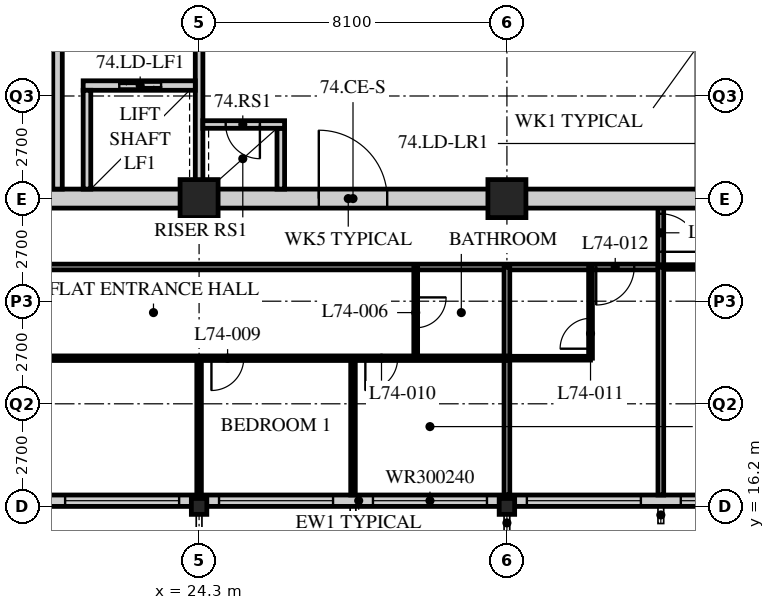
"""IFC4 building model, lengths in metres.
Left out: names, types, materials, properties, quantities, classifications, styles, units other than length and angle.
Written with IfcOpenShell. Run it as: python <this file> out.ifc"""

import sys

from ifc_helpers import new_model, si_unit, direction, frame, frame_2d, origin, origin_2d, place, context, subcontext, project, spatial, rectangle, hollow_rectangle, i_section, extrude, element, fill, save


model = new_model("IFC4")
c1 = context("Model", 3, precision=1e-05, world=origin(), true_north=direction((0.0, 1.0)))
c2 = subcontext(c1, "Body", "Model", "MODEL_VIEW")
j1 = project(units=[si_unit("LENGTHUNIT", "METRE"), si_unit("PLANEANGLEUNIT", "RADIAN")], contexts=[c1])
p1 = place(None, origin())
s1 = spatial("IfcSite", under=j1, at=p1, CompositionType="ELEMENT")
p2 = place(p1, origin())
s2 = spatial("IfcBuilding", under=s1, at=p2, CompositionType="ELEMENT")
p3 = place(p2, frame((0.0, 0.0, 289.2)))
s3 = spatial("IfcBuildingStorey", under=s2, at=p3, CompositionType="ELEMENT", Elevation=289.2)
p4 = place(p3, frame((24.3, 16.2, 0.0), z_axis=(0.0, 0.0, 1.0), x_axis=(1.0, 0.0, 0.0)))
e1 = element("IfcColumn", 1, at=p4, inside=s3, PredefinedType="COLUMN", context=c2, shape_type="SweptSolid", body=[
    extrude(i_section(OverallWidth=0.407, OverallDepth=0.419, WebThickness=0.031, FlangeThickness=0.049, FilletRadius=0.015, at=origin_2d()), origin(), (0.0, 0.0, 1.0), 3.9),
])
p5 = place(p3, frame((24.3, 24.3, 0.0), z_axis=(0.0, 0.0, 1.0), x_axis=(1.0, 0.0, 0.0)))
e2 = element("IfcColumn", 2, at=p5, inside=s3, PredefinedType="COLUMN", context=c2, shape_type="SweptSolid", body=[
    extrude(hollow_rectangle(XDim=1.0, YDim=1.0, WallThickness=0.1, at=origin_2d()), origin(), (0.0, 0.0, 1.0), 3.9),
])
p6 = place(p3, frame((32.4, 16.2, 0.0), z_axis=(0.0, 0.0, 1.0), x_axis=(1.0, 0.0, 0.0)))
e3 = element("IfcColumn", 3, at=p6, inside=s3, PredefinedType="COLUMN", context=c2, shape_type="SweptSolid", body=[
    extrude(i_section(OverallWidth=0.407, OverallDepth=0.419, WebThickness=0.031, FlangeThickness=0.049, FilletRadius=0.015, at=origin_2d()), origin(), (0.0, 0.0, 1.0), 3.9),
])
p7 = place(p3, frame((32.4, 24.3, 0.0), z_axis=(0.0, 0.0, 1.0), x_axis=(1.0, 0.0, 0.0)))
e4 = element("IfcColumn", 4, at=p7, inside=s3, PredefinedType="COLUMN", context=c2, shape_type="SweptSolid", body=[
    extrude(hollow_rectangle(XDim=1.0, YDim=1.0, WallThickness=0.1, at=origin_2d()), origin(), (0.0, 0.0, 1.0), 3.9),
])
p8 = place(p3, frame((8.4, 16.35, 0.0), z_axis=(0.0, 0.0, 1.0), x_axis=(1.0, 0.0, 0.0)))
e5 = element("IfcWall", 5, at=p8, inside=s3, PredefinedType="SOLIDWALL", context=c2, shape_type="SweptSolid", body=[
    extrude(rectangle(XDim=40.2, YDim=0.3, at=frame_2d((20.1, 0.0))), origin(), (0.0, 0.0, 1.0), 3.69),
])
p9 = place(p8, frame((0.225, 0.0, 0.6)))
e6 = element("IfcOpeningElement", 6, at=p9, cuts=e5, PredefinedType="OPENING", context=c2, shape_type="SweptSolid", body=[
    extrude(rectangle(XDim=3.0, YDim=2.4, at=frame_2d((1.5, 1.2))), frame((0.0, 0.16, 0.0), z_axis=(0.0, -1.0, 0.0), x_axis=(1.0, 0.0, 0.0)), (0.0, 0.0, 1.0), 0.32),
])
p10 = place(p8, frame((4.275, 0.0, 0.6)))
e7 = element("IfcOpeningElement", 7, at=p10, cuts=e5, PredefinedType="OPENING", context=c2, shape_type="SweptSolid", body=[
    extrude(rectangle(XDim=3.0, YDim=2.4, at=frame_2d((1.5, 1.2))), frame((0.0, 0.16, 0.0), z_axis=(0.0, -1.0, 0.0), x_axis=(1.0, 0.0, 0.0)), (0.0, 0.0, 1.0), 0.32),
])
p11 = place(p8, frame((8.325, 0.0, 0.6)))
e8 = element("IfcOpeningElement", 8, at=p11, cuts=e5, PredefinedType="OPENING", context=c2, shape_type="SweptSolid", body=[
    extrude(rectangle(XDim=3.0, YDim=2.4, at=frame_2d((1.5, 1.2))), frame((0.0, 0.16, 0.0), z_axis=(0.0, -1.0, 0.0), x_axis=(1.0, 0.0, 0.0)), (0.0, 0.0, 1.0), 0.32),
])
p12 = place(p8, frame((12.375, 0.0, 0.6)))
e9 = element("IfcOpeningElement", 9, at=p12, cuts=e5, PredefinedType="OPENING", context=c2, shape_type="SweptSolid", body=[
    extrude(rectangle(XDim=3.0, YDim=2.4, at=frame_2d((1.5, 1.2))), frame((0.0, 0.16, 0.0), z_axis=(0.0, -1.0, 0.0), x_axis=(1.0, 0.0, 0.0)), (0.0, 0.0, 1.0), 0.32),
])
p13 = place(p8, frame((16.425, 0.0, 0.6)))
e10 = element("IfcOpeningElement", 10, at=p13, cuts=e5, PredefinedType="OPENING", context=c2, shape_type="SweptSolid", body=[
    extrude(rectangle(XDim=3.0, YDim=2.4, at=frame_2d((1.5, 1.2))), frame((0.0, 0.16, 0.0), z_axis=(0.0, -1.0, 0.0), x_axis=(1.0, 0.0, 0.0)), (0.0, 0.0, 1.0), 0.32),
])
p14 = place(p8, frame((20.475, 0.0, 0.6)))
e11 = element("IfcOpeningElement", 11, at=p14, cuts=e5, PredefinedType="OPENING", context=c2, shape_type="SweptSolid", body=[
    extrude(rectangle(XDim=3.0, YDim=2.4, at=frame_2d((1.5, 1.2))), frame((0.0, 0.16, 0.0), z_axis=(0.0, -1.0, 0.0), x_axis=(1.0, 0.0, 0.0)), (0.0, 0.0, 1.0), 0.32),
])
p15 = place(p8, frame((24.525, 0.0, 0.6)))
e12 = element("IfcOpeningElement", 12, at=p15, cuts=e5, PredefinedType="OPENING", context=c2, shape_type="SweptSolid", body=[
    extrude(rectangle(XDim=3.0, YDim=2.4, at=frame_2d((1.5, 1.2))), frame((0.0, 0.16, 0.0), z_axis=(0.0, -1.0, 0.0), x_axis=(1.0, 0.0, 0.0)), (0.0, 0.0, 1.0), 0.32),
])
p16 = place(p8, frame((28.575, 0.0, 0.6)))
e13 = element("IfcOpeningElement", 13, at=p16, cuts=e5, PredefinedType="OPENING", context=c2, shape_type="SweptSolid", body=[
    extrude(rectangle(XDim=3.0, YDim=2.4, at=frame_2d((1.5, 1.2))), frame((0.0, 0.16, 0.0), z_axis=(0.0, -1.0, 0.0), x_axis=(1.0, 0.0, 0.0)), (0.0, 0.0, 1.0), 0.32),
])
p17 = place(p8, frame((32.625, 0.0, 0.6)))
e14 = element("IfcOpeningElement", 14, at=p17, cuts=e5, PredefinedType="OPENING", context=c2, shape_type="SweptSolid", body=[
    extrude(rectangle(XDim=3.0, YDim=2.4, at=frame_2d((1.5, 1.2))), frame((0.0, 0.16, 0.0), z_axis=(0.0, -1.0, 0.0), x_axis=(1.0, 0.0, 0.0)), (0.0, 0.0, 1.0), 0.32),
])
p18 = place(p8, frame((36.675, 0.0, 0.6)))
e15 = element("IfcOpeningElement", 15, at=p18, cuts=e5, PredefinedType="OPENING", context=c2, shape_type="SweptSolid", body=[
    extrude(rectangle(XDim=3.0, YDim=2.4, at=frame_2d((1.5, 1.2))), frame((0.0, 0.16, 0.0), z_axis=(0.0, -1.0, 0.0), x_axis=(1.0, 0.0, 0.0)), (0.0, 0.0, 1.0), 0.32),
])
p19 = place(p3, frame((12.15, 22.5, 0.0), z_axis=(0.0, 0.0, 1.0), x_axis=(1.0, 0.0, 0.0)))
e16 = element("IfcWall", 16, at=p19, inside=s3, PredefinedType="PARTITIONING", context=c2, shape_type="SweptSolid", body=[
    extrude(rectangle(XDim=24.3, YDim=0.15, at=frame_2d((12.15, 0.0))), origin(), (0.0, 0.0, 1.0), 3.69),
])
p20 = place(p19, frame((4.45, 0.0, 0.0)))
e17 = element("IfcOpeningElement", 17, at=p20, cuts=e16, PredefinedType="OPENING", context=c2, shape_type="SweptSolid", body=[
    extrude(rectangle(XDim=1.0, YDim=2.1, at=frame_2d((0.5, 1.05))), frame((0.0, 0.085, 0.0), z_axis=(0.0, -1.0, 0.0), x_axis=(1.0, 0.0, 0.0)), (0.0, 0.0, 1.0), 0.17),
])
p21 = place(p19, frame((22.6, 0.0, 0.0)))
e18 = element("IfcOpeningElement", 18, at=p21, cuts=e16, PredefinedType="OPENING", context=c2, shape_type="SweptSolid", body=[
    extrude(rectangle(XDim=1.0, YDim=2.1, at=frame_2d((0.5, 1.05))), frame((0.0, 0.085, 0.0), z_axis=(0.0, -1.0, 0.0), x_axis=(1.0, 0.0, 0.0)), (0.0, 0.0, 1.0), 0.17),
])
p22 = place(p19, frame((2.625, 0.0, 0.0)))
e19 = element("IfcOpeningElement", 19, at=p22, cuts=e16, PredefinedType="OPENING", context=c2, shape_type="SweptSolid", body=[
    extrude(rectangle(XDim=1.0, YDim=2.1, at=frame_2d((0.5, 1.05))), frame((0.0, 0.085, 0.0), z_axis=(0.0, -1.0, 0.0), x_axis=(1.0, 0.0, 0.0)), (0.0, 0.0, 1.0), 0.17),
])
p23 = place(p3, frame((36.45, 22.5, 0.0), z_axis=(0.0, 0.0, 1.0), x_axis=(0.0, 1.0, 0.0)))
e20 = element("IfcWall", 20, at=p23, inside=s3, PredefinedType="PARTITIONING", context=c2, shape_type="SweptSolid", body=[
    extrude(rectangle(XDim=1.8, YDim=0.15, at=frame_2d((0.9, 0.0))), origin(), (0.0, 0.0, 1.0), 3.69),
])
p24 = place(p23, frame((0.4, 0.0, 0.0)))
e21 = element("IfcOpeningElement", 21, at=p24, cuts=e20, PredefinedType="OPENING", context=c2, shape_type="SweptSolid", body=[
    extrude(rectangle(XDim=1.0, YDim=2.1, at=frame_2d((0.5, 1.05))), frame((0.0, 0.085, 0.0), z_axis=(0.0, -1.0, 0.0), x_axis=(1.0, 0.0, 0.0)), (0.0, 0.0, 1.0), 0.17),
])
p25 = place(p3, frame((30.0, 22.5, 0.0), z_axis=(0.0, 0.0, 1.0), x_axis=(0.0, -1.0, 0.0)))
e22 = element("IfcWall", 22, at=p25, inside=s3, PredefinedType="PARTITIONING", context=c2, shape_type="SweptSolid", body=[
    extrude(rectangle(XDim=2.4, YDim=0.1, at=frame_2d((1.2, 0.0))), origin(), (0.0, 0.0, 1.0), 3.69),
])
p26 = place(p25, frame((0.8, 0.0, 0.0)))
e23 = element("IfcOpeningElement", 23, at=p26, cuts=e22, PredefinedType="OPENING", context=c2, shape_type="SweptSolid", body=[
    extrude(rectangle(XDim=0.8, YDim=2.1, at=frame_2d((0.4, 1.05))), frame((0.0, 0.06, 0.0), z_axis=(0.0, -1.0, 0.0), x_axis=(1.0, 0.0, 0.0)), (0.0, 0.0, 1.0), 0.12),
])
p27 = place(p3, frame((24.3, 20.1, 0.0), z_axis=(0.0, 0.0, 1.0), x_axis=(0.0, -1.0, 0.0)))
e24 = element("IfcWall", 24, at=p27, inside=s3, PredefinedType="PARTITIONING", context=c2, shape_type="SweptSolid", body=[
    extrude(rectangle(XDim=3.6, YDim=0.12, at=frame_2d((1.8, 0.0))), origin(), (0.0, 0.0, 1.0), 3.078),
])
p28 = place(p3, frame((28.35, 20.1, 0.0), z_axis=(0.0, 0.0, 1.0), x_axis=(0.0, -1.0, 0.0)))
e25 = element("IfcWall", 25, at=p28, inside=s3, PredefinedType="PARTITIONING", context=c2, shape_type="SweptSolid", body=[
    extrude(rectangle(XDim=3.6, YDim=0.12, at=frame_2d((1.8, 0.0))), origin(), (0.0, 0.0, 1.0), 3.69),
])
p29 = place(p3, frame((32.4, 22.5, 0.0), z_axis=(0.0, 0.0, 1.0), x_axis=(0.0, -1.0, 0.0)))
e26 = element("IfcWall", 26, at=p29, inside=s3, PredefinedType="PARTITIONING", context=c2, shape_type="SweptSolid", body=[
    extrude(rectangle(XDim=6.0, YDim=0.15, at=frame_2d((3.0, 0.0))), origin(), (0.0, 0.0, 1.0), 3.078),
])
p30 = place(p3, frame((32.4, 20.1, 0.0), z_axis=(0.0, 0.0, 1.0), x_axis=(1.0, 0.0, 0.0)))
e27 = element("IfcWall", 27, at=p30, inside=s3, PredefinedType="PARTITIONING", context=c2, shape_type="SweptSolid", body=[
    extrude(rectangle(XDim=2.2, YDim=0.1, at=frame_2d((1.1, 0.0))), origin(), (0.0, 0.0, 1.0), 3.69),
])
p31 = place(p3, frame((34.6, 22.5, 0.0), z_axis=(0.0, 0.0, 1.0), x_axis=(0.0, -1.0, 0.0)))
e28 = element("IfcWall", 28, at=p31, inside=s3, PredefinedType="PARTITIONING", context=c2, shape_type="SweptSolid", body=[
    extrude(rectangle(XDim=2.4, YDim=0.1, at=frame_2d((1.2, 0.0))), origin(), (0.0, 0.0, 1.0), 3.69),
])
p32 = place(p31, frame((1.35, 0.0, 0.0)))
e29 = element("IfcOpeningElement", 29, at=p32, cuts=e28, PredefinedType="OPENING", context=c2, shape_type="SweptSolid", body=[
    extrude(rectangle(XDim=0.8, YDim=2.1, at=frame_2d((0.4, 1.05))), frame((0.0, 0.06, 0.0), z_axis=(0.0, -1.0, 0.0), x_axis=(1.0, 0.0, 0.0)), (0.0, 0.0, 1.0), 0.12),
])
p33 = place(p3, frame((12.15, 20.1, 0.0), z_axis=(0.0, 0.0, 1.0), x_axis=(1.0, 0.0, 0.0)))
e30 = element("IfcWall", 30, at=p33, inside=s3, PredefinedType="PARTITIONING", context=c2, shape_type="SweptSolid", body=[
    extrude(rectangle(XDim=20.25, YDim=0.12, at=frame_2d((10.125, 0.0))), origin(), (0.0, 0.0, 1.0), 3.69),
])
p34 = place(p33, frame((5.025, 0.0, 0.0)))
e31 = element("IfcOpeningElement", 31, at=p34, cuts=e30, PredefinedType="OPENING", context=c2, shape_type="SweptSolid", body=[
    extrude(rectangle(XDim=0.85, YDim=2.1, at=frame_2d((0.425, 1.05))), frame((0.0, 0.07, 0.0), z_axis=(0.0, -1.0, 0.0), x_axis=(1.0, 0.0, 0.0)), (0.0, 0.0, 1.0), 0.14),
])
p35 = place(p33, frame((12.475, 0.0, 0.0)))
e32 = element("IfcOpeningElement", 32, at=p35, cuts=e30, PredefinedType="OPENING", context=c2, shape_type="SweptSolid", body=[
    extrude(rectangle(XDim=0.85, YDim=2.1, at=frame_2d((0.425, 1.05))), frame((0.0, 0.07, 0.0), z_axis=(0.0, -1.0, 0.0), x_axis=(1.0, 0.0, 0.0)), (0.0, 0.0, 1.0), 0.14),
])
p36 = place(p33, frame((16.525, 0.0, 0.0)))
e33 = element("IfcOpeningElement", 33, at=p36, cuts=e30, PredefinedType="OPENING", context=c2, shape_type="SweptSolid", body=[
    extrude(rectangle(XDim=0.85, YDim=2.1, at=frame_2d((0.425, 1.05))), frame((0.0, 0.07, 0.0), z_axis=(0.0, -1.0, 0.0), x_axis=(1.0, 0.0, 0.0)), (0.0, 0.0, 1.0), 0.14),
])
p37 = place(p33, frame((2.725, 0.0, 0.0)))
e34 = element("IfcOpeningElement", 34, at=p37, cuts=e30, PredefinedType="OPENING", context=c2, shape_type="SweptSolid", body=[
    extrude(rectangle(XDim=0.85, YDim=2.1, at=frame_2d((0.425, 1.05))), frame((0.0, 0.07, 0.0), z_axis=(0.0, -1.0, 0.0), x_axis=(1.0, 0.0, 0.0)), (0.0, 0.0, 1.0), 0.14),
])
p38 = place(p3, frame((36.45, 22.5, 0.0), z_axis=(0.0, 0.0, 1.0), x_axis=(1.0, 0.0, 0.0)))
e35 = element("IfcWall", 35, at=p38, inside=s3, PredefinedType="PARTITIONING", context=c2, shape_type="SweptSolid", body=[
    extrude(rectangle(XDim=6.45, YDim=0.12, at=frame_2d((3.225, 0.0))), origin(), (0.0, 0.0, 1.0), 3.69),
])
p39 = place(p38, frame((2.8, 0.0, 0.0)))
e36 = element("IfcOpeningElement", 36, at=p39, cuts=e35, PredefinedType="OPENING", context=c2, shape_type="SweptSolid", body=[
    extrude(rectangle(XDim=0.85, YDim=2.1, at=frame_2d((0.425, 1.05))), frame((0.0, 0.07, 0.0), z_axis=(0.0, -1.0, 0.0), x_axis=(1.0, 0.0, 0.0)), (0.0, 0.0, 1.0), 0.14),
])
p40 = place(p3, frame((36.45, 16.5, 0.0), z_axis=(0.0, 0.0, 1.0), x_axis=(0.0, 1.0, 0.0)))
e37 = element("IfcWall", 37, at=p40, inside=s3, PredefinedType="PARTITIONING", context=c2, shape_type="SweptSolid", body=[
    extrude(rectangle(XDim=6.0, YDim=0.15, at=frame_2d((3.0, 0.0))), origin(), (0.0, 0.0, 1.0), 3.69),
])
p41 = place(p3, frame((15.95, 24.3, 0.0), z_axis=(0.0, 0.0, 1.0), x_axis=(1.0, 0.0, 0.0)))
e38 = element("IfcWall", 38, at=p41, inside=s3, PredefinedType="SOLIDWALL", context=c2, shape_type="SweptSolid", body=[
    extrude(rectangle(XDim=24.55, YDim=0.5, at=frame_2d((12.275, 0.0))), origin(), (0.0, 0.0, 1.0), 3.04),
])
p42 = place(p41, frame((11.5, 0.0, 0.0)))
e39 = element("IfcOpeningElement", 39, at=p42, cuts=e38, PredefinedType="OPENING", context=c2, shape_type="SweptSolid", body=[
    extrude(rectangle(XDim=1.8, YDim=2.4, at=frame_2d((0.9, 1.2))), frame((0.0, 0.26, 0.0), z_axis=(0.0, -1.0, 0.0), x_axis=(1.0, 0.0, 0.0)), (0.0, 0.0, 1.0), 0.52),
])
p43 = place(p3, frame((24.3, 24.55, 0.0), z_axis=(0.0, 0.0, 1.0), x_axis=(0.0, 1.0, 0.0)))
e40 = element("IfcWall", 40, at=p43, inside=s3, PredefinedType="SOLIDWALL", context=c2, shape_type="SweptSolid", body=[
    extrude(rectangle(XDim=7.75, YDim=0.2, at=frame_2d((3.875, 0.0))), origin(), (0.0, 0.0, 1.0), 3.078),
])
p44 = place(p43, frame((4.6, 0.0, 0.0)))
e41 = element("IfcOpeningElement", 41, at=p44, cuts=e40, PredefinedType="OPENING", context=c2, shape_type="SweptSolid", body=[
    extrude(rectangle(XDim=1.2, YDim=2.1, at=frame_2d((0.6, 1.05))), frame((0.0, 0.11, 0.0), z_axis=(0.0, -1.0, 0.0), x_axis=(1.0, 0.0, 0.0)), (0.0, 0.0, 1.0), 0.22),
])
p45 = place(p3, frame((20.575, 24.55, 0.0), z_axis=(0.0, 0.0, 1.0), x_axis=(0.0, 1.0, 0.0)))
e42 = element("IfcWall", 42, at=p45, inside=s3, PredefinedType="SOLIDWALL", context=c2, shape_type="SweptSolid", body=[
    extrude(rectangle(XDim=7.75, YDim=0.25, at=frame_2d((3.875, 0.0))), origin(), (0.0, 0.0, 1.0), 3.69),
])
p46 = place(p45, frame((6.2, 0.0, 0.0)))
e43 = element("IfcOpeningElement", 43, at=p46, cuts=e42, PredefinedType="OPENING", context=c2, shape_type="SweptSolid", body=[
    extrude(rectangle(XDim=1.2, YDim=2.1, at=frame_2d((0.6, 1.05))), frame((0.0, 0.135, 0.0), z_axis=(0.0, -1.0, 0.0), x_axis=(1.0, 0.0, 0.0)), (0.0, 0.0, 1.0), 0.27),
])
p47 = place(p3, frame((21.25, 27.275, 0.0), z_axis=(0.0, 0.0, 1.0), x_axis=(1.0, 0.0, 0.0)))
e44 = element("IfcWall", 44, at=p47, inside=s3, PredefinedType="SOLIDWALL", context=c2, shape_type="SweptSolid", body=[
    extrude(rectangle(XDim=2.95, YDim=0.25, at=frame_2d((1.475, 0.0))), origin(), (0.0, 0.0, 1.0), 3.69),
])
p48 = place(p47, frame((0.95, 0.0, 0.0)))
e45 = element("IfcOpeningElement", 45, at=p48, cuts=e44, PredefinedType="OPENING", context=c2, shape_type="SweptSolid", body=[
    extrude(rectangle(XDim=1.1, YDim=2.4, at=frame_2d((0.55, 1.2))), frame((0.0, 0.135, 0.0), z_axis=(0.0, -1.0, 0.0), x_axis=(1.0, 0.0, 0.0)), (0.0, 0.0, 1.0), 0.27),
])
p49 = place(p3, frame((21.35, 24.55, 0.0), z_axis=(0.0, 0.0, 1.0), x_axis=(0.0, 1.0, 0.0)))
e46 = element("IfcWall", 46, at=p49, inside=s3, PredefinedType="SOLIDWALL", context=c2, shape_type="SweptSolid", body=[
    extrude(rectangle(XDim=2.6, YDim=0.2, at=frame_2d((1.3, 0.0))), origin(), (0.0, 0.0, 1.0), 3.69),
])
p50 = place(p3, frame((26.45, 24.55, 0.0), z_axis=(0.0, 0.0, 1.0), x_axis=(0.0, 1.0, 0.0)))
e47 = element("IfcWall", 47, at=p50, inside=s3, PredefinedType="SOLIDWALL", context=c2, shape_type="SweptSolid", body=[
    extrude(rectangle(XDim=1.6, YDim=0.2, at=frame_2d((0.8, 0.0))), origin(), (0.0, 0.0, 1.0), 3.69),
])
p51 = place(p3, frame((24.4, 26.25, 0.0), z_axis=(0.0, 0.0, 1.0), x_axis=(1.0, 0.0, 0.0)))
e48 = element("IfcWall", 48, at=p51, inside=s3, PredefinedType="SOLIDWALL", context=c2, shape_type="SweptSolid", body=[
    extrude(rectangle(XDim=2.15, YDim=0.2, at=frame_2d((1.075, 0.0))), origin(), (0.0, 0.0, 1.0), 3.69),
])
p52 = place(p51, frame((0.6, 0.0, 0.0)))
e49 = element("IfcOpeningElement", 49, at=p52, cuts=e48, PredefinedType="OPENING", context=c2, shape_type="SweptSolid", body=[
    extrude(rectangle(XDim=0.9, YDim=2.1, at=frame_2d((0.45, 1.05))), frame((0.0, 0.11, 0.0), z_axis=(0.0, -1.0, 0.0), x_axis=(1.0, 0.0, 0.0)), (0.0, 0.0, 1.0), 0.22),
])
p53 = place(p12, origin())
e50 = element("IfcWindow", 50, at=p53, inside=s3, PartitioningType="SINGLE_PANEL", PredefinedType="WINDOW", context=c2, shape_type="SweptSolid", body=[
    extrude(rectangle(XDim=3.0, YDim=2.4, at=frame_2d((1.5, 1.2))), frame((0.0, 0.03, 0.0), z_axis=(0.0, -1.0, 0.0), x_axis=(1.0, 0.0, 0.0)), (0.0, 0.0, 1.0), 0.06),
])
fill(e9, e50)
p54 = place(p13, origin())
e51 = element("IfcWindow", 51, at=p54, inside=s3, PartitioningType="SINGLE_PANEL", PredefinedType="WINDOW", context=c2, shape_type="SweptSolid", body=[
    extrude(rectangle(XDim=3.0, YDim=2.4, at=frame_2d((1.5, 1.2))), frame((0.0, 0.03, 0.0), z_axis=(0.0, -1.0, 0.0), x_axis=(1.0, 0.0, 0.0)), (0.0, 0.0, 1.0), 0.06),
])
fill(e10, e51)
p55 = place(p14, origin())
e52 = element("IfcWindow", 52, at=p55, inside=s3, PartitioningType="SINGLE_PANEL", PredefinedType="WINDOW", context=c2, shape_type="SweptSolid", body=[
    extrude(rectangle(XDim=3.0, YDim=2.4, at=frame_2d((1.5, 1.2))), frame((0.0, 0.03, 0.0), z_axis=(0.0, -1.0, 0.0), x_axis=(1.0, 0.0, 0.0)), (0.0, 0.0, 1.0), 0.06),
])
fill(e11, e52)
p56 = place(p15, origin())
e53 = element("IfcWindow", 53, at=p56, inside=s3, PartitioningType="SINGLE_PANEL", PredefinedType="WINDOW", context=c2, shape_type="SweptSolid", body=[
    extrude(rectangle(XDim=3.0, YDim=2.4, at=frame_2d((1.5, 1.2))), frame((0.0, 0.03, 0.0), z_axis=(0.0, -1.0, 0.0), x_axis=(1.0, 0.0, 0.0)), (0.0, 0.0, 1.0), 0.06),
])
fill(e12, e53)
p57 = place(p16, origin())
e54 = element("IfcWindow", 54, at=p57, inside=s3, PartitioningType="SINGLE_PANEL", PredefinedType="WINDOW", context=c2, shape_type="SweptSolid", body=[
    extrude(rectangle(XDim=3.0, YDim=2.4, at=frame_2d((1.5, 1.2))), frame((0.0, 0.03, 0.0), z_axis=(0.0, -1.0, 0.0), x_axis=(1.0, 0.0, 0.0)), (0.0, 0.0, 1.0), 0.06),
])
fill(e13, e54)
p58 = place(p26, origin())
e55 = element("IfcDoor", 55, at=p58, inside=s3, OperationType="SINGLE_SWING_LEFT", PredefinedType="DOOR", context=c2, shape_type="SweptSolid", body=[
    extrude(rectangle(XDim=0.8, YDim=2.1, at=frame_2d((0.4, 1.05))), frame((0.0, 0.025, 0.0), z_axis=(0.0, -1.0, 0.0), x_axis=(1.0, 0.0, 0.0)), (0.0, 0.0, 1.0), 0.05),
])
fill(e23, e55)
p59 = place(p35, origin())
e56 = element("IfcDoor", 56, at=p59, inside=s3, OperationType="SINGLE_SWING_RIGHT", PredefinedType="DOOR", context=c2, shape_type="SweptSolid", body=[
    extrude(rectangle(XDim=0.85, YDim=2.1, at=frame_2d((0.425, 1.05))), frame((0.0, 0.025, 0.0), z_axis=(0.0, -1.0, 0.0), x_axis=(1.0, 0.0, 0.0)), (0.0, 0.0, 1.0), 0.05),
])
fill(e32, e56)
p60 = place(p36, origin())
e57 = element("IfcDoor", 57, at=p60, inside=s3, OperationType="SINGLE_SWING_RIGHT", PredefinedType="DOOR", context=c2, shape_type="SweptSolid", body=[
    extrude(rectangle(XDim=0.85, YDim=2.1, at=frame_2d((0.425, 1.05))), frame((0.0, 0.025, 0.0), z_axis=(0.0, -1.0, 0.0), x_axis=(1.0, 0.0, 0.0)), (0.0, 0.0, 1.0), 0.05),
])
fill(e33, e57)
p61 = place(p32, origin())
e58 = element("IfcDoor", 58, at=p61, inside=s3, OperationType="SINGLE_SWING_LEFT", PredefinedType="DOOR", context=c2, shape_type="SweptSolid", body=[
    extrude(rectangle(XDim=0.8, YDim=2.1, at=frame_2d((0.4, 1.05))), frame((0.0, 0.025, 0.0), z_axis=(0.0, -1.0, 0.0), x_axis=(1.0, 0.0, 0.0)), (0.0, 0.0, 1.0), 0.05),
])
fill(e29, e58)
p62 = place(p21, origin())
e59 = element("IfcDoor", 59, at=p62, inside=s3, OperationType="SINGLE_SWING_RIGHT", PredefinedType="DOOR", context=c2, shape_type="SweptSolid", body=[
    extrude(rectangle(XDim=1.0, YDim=2.1, at=frame_2d((0.5, 1.05))), frame((0.0, 0.025, 0.0), z_axis=(0.0, -1.0, 0.0), x_axis=(1.0, 0.0, 0.0)), (0.0, 0.0, 1.0), 0.05),
])
fill(e18, e59)
p63 = place(p24, origin())
e60 = element("IfcDoor", 60, at=p63, inside=s3, OperationType="SINGLE_SWING_RIGHT", PredefinedType="DOOR", context=c2, shape_type="SweptSolid", body=[
    extrude(rectangle(XDim=1.0, YDim=2.1, at=frame_2d((0.5, 1.05))), frame((0.0, 0.025, 0.0), z_axis=(0.0, -1.0, 0.0), x_axis=(1.0, 0.0, 0.0)), (0.0, 0.0, 1.0), 0.05),
])
fill(e21, e60)
p64 = place(p52, origin())
e61 = element("IfcDoor", 61, at=p64, inside=s3, OperationType="SINGLE_SWING_LEFT", PredefinedType="DOOR", context=c2, shape_type="SweptSolid", body=[
    extrude(rectangle(XDim=0.9, YDim=2.1, at=frame_2d((0.45, 1.05))), frame((0.0, 0.025, 0.0), z_axis=(0.0, -1.0, 0.0), x_axis=(1.0, 0.0, 0.0)), (0.0, 0.0, 1.0), 0.05),
])
fill(e49, e61)
p65 = place(p48, origin())
e62 = element("IfcDoor", 62, at=p65, inside=s3, OperationType="DOUBLE_DOOR_SLIDING", PredefinedType="DOOR", context=c2, shape_type="SweptSolid", body=[
    extrude(rectangle(XDim=1.1, YDim=2.4, at=frame_2d((0.55, 1.2))), frame((0.0, 0.025, 0.0), z_axis=(0.0, -1.0, 0.0), x_axis=(1.0, 0.0, 0.0)), (0.0, 0.0, 1.0), 0.05),
])
fill(e45, e62)
p66 = place(p42, origin())
e63 = element("IfcDoor", 63, at=p66, inside=s3, OperationType="DOUBLE_DOOR_SINGLE_SWING", PredefinedType="DOOR", context=c2, shape_type="SweptSolid", body=[
    extrude(rectangle(XDim=1.8, YDim=2.4, at=frame_2d((0.9, 1.2))), frame((0.0, 0.025, 0.0), z_axis=(0.0, -1.0, 0.0), x_axis=(1.0, 0.0, 0.0)), (0.0, 0.0, 1.0), 0.05),
])
fill(e39, e63)
save(model, sys.argv[1])
